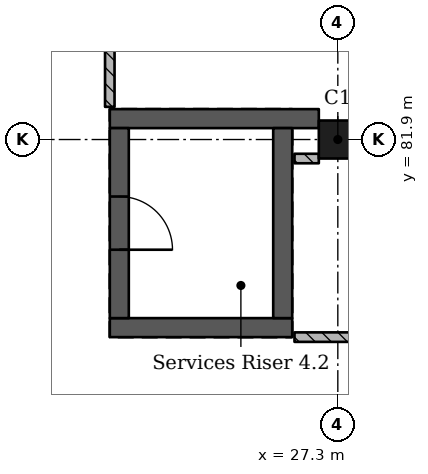
"""IFC4 building model, lengths in metres.
Left out: names, types, materials, properties, quantities, classifications, styles, units other than length and angle.
Written with IfcOpenShell. Run it as: python <this file> out.ifc"""

import sys

from ifc_helpers import new_model, si_unit, direction, frame, frame_2d, origin, origin_2d, place, context, subcontext, project, spatial, rectangle, extrude, element, fill, save


model = new_model("IFC4")
c1 = context("Model", 3, precision=1e-05, world=origin(), true_north=direction((0.0, 1.0)))
c2 = subcontext(c1, "Body", "Model", "MODEL_VIEW")
j1 = project(units=[si_unit("LENGTHUNIT", "METRE"), si_unit("PLANEANGLEUNIT", "RADIAN")], contexts=[c1])
p1 = place(None, origin())
s1 = spatial("IfcSite", under=j1, at=p1, CompositionType="ELEMENT")
p2 = place(p1, origin())
s2 = spatial("IfcBuilding", under=s1, at=p2, CompositionType="ELEMENT")
p3 = place(p2, frame((0.0, 0.0, 24.57)))
s3 = spatial("IfcBuildingStorey", under=s2, at=p3, CompositionType="ELEMENT", Elevation=24.57)
p4 = place(p3, frame((27.3, 81.9, 0.0), z_axis=(0.0, 0.0, 1.0), x_axis=(1.0, 0.0, 0.0)))
e1 = element("IfcColumn", 1, at=p4, inside=s3, PredefinedType="COLUMN", context=c2, shape_type="SweptSolid", body=[
    extrude(rectangle(XDim=0.5, YDim=0.5, at=origin_2d()), origin(), (0.0, 0.0, 1.0), 4.55),
])
p5 = place(p3, frame((26.7, 79.425, 0.0), z_axis=(0.0, 0.0, 1.0), x_axis=(-1.0, 0.0, 0.0)))
e2 = element("IfcWall", 2, at=p5, inside=s3, PredefinedType="SHEAR", context=c2, shape_type="SweptSolid", body=[
    extrude(rectangle(XDim=2.4, YDim=0.25, at=frame_2d((1.2, 0.0))), origin(), (0.0, 0.0, 1.0), 4.55),
])
p6 = place(p3, frame((27.05, 82.175, 0.0), z_axis=(0.0, 0.0, 1.0), x_axis=(-1.0, 0.0, 0.0)))
e3 = element("IfcWall", 3, at=p6, inside=s3, PredefinedType="SHEAR", context=c2, shape_type="SweptSolid", body=[
    extrude(rectangle(XDim=2.75, YDim=0.25, at=frame_2d((1.375, 0.0))), origin(), (0.0, 0.0, 1.0), 4.55),
])
p7 = place(p3, frame((24.425, 82.05, 0.0), z_axis=(0.0, 0.0, 1.0), x_axis=(0.0, -1.0, 0.0)))
e4 = element("IfcWall", 4, at=p7, inside=s3, PredefinedType="SHEAR", context=c2, shape_type="SweptSolid", body=[
    extrude(rectangle(XDim=2.5, YDim=0.25, at=frame_2d((1.25, 0.0))), origin(), (0.0, 0.0, 1.0), 4.55),
])
p8 = place(p7, frame((0.9, 0.0, 0.0)))
e5 = element("IfcOpeningElement", 5, at=p8, cuts=e4, PredefinedType="OPENING", context=c2, shape_type="SweptSolid", body=[
    extrude(rectangle(XDim=0.7, YDim=2.1, at=frame_2d((0.35, 1.05))), frame((0.0, 0.135, 0.0), z_axis=(0.0, -1.0, 0.0), x_axis=(1.0, 0.0, 0.0)), (0.0, 0.0, 1.0), 0.27),
])
p9 = place(p3, frame((26.575, 82.05, 0.0), z_axis=(0.0, 0.0, 1.0), x_axis=(0.0, -1.0, 0.0)))
e6 = element("IfcWall", 6, at=p9, inside=s3, PredefinedType="SHEAR", context=c2, shape_type="SweptSolid", body=[
    extrude(rectangle(XDim=2.5, YDim=0.25, at=frame_2d((1.25, 0.0))), origin(), (0.0, 0.0, 1.0), 4.55),
])
p10 = place(p3, frame((24.3, 82.33, 0.0), z_axis=(0.0, 0.0, 1.0), x_axis=(0.0, 1.0, 0.0)))
e7 = element("IfcWall", 7, at=p10, inside=s3, PredefinedType="PARTITIONING", context=c2, shape_type="SweptSolid", body=[
    extrude(rectangle(XDim=6.97, YDim=0.125, at=frame_2d((3.485, 0.0))), origin(), (0.0, 0.0, 1.0), 4.35),
])
p11 = place(p3, frame((26.73, 81.65, 0.0), z_axis=(0.0, 0.0, 1.0), x_axis=(1.0, 0.0, 0.0)))
e8 = element("IfcWall", 8, at=p11, inside=s3, PredefinedType="PARTITIONING", context=c2, shape_type="SweptSolid", body=[
    extrude(rectangle(XDim=0.32, YDim=0.125, at=frame_2d((0.16, 0.0))), origin(), (0.0, 0.0, 1.0), 4.35),
])
p12 = place(p3, frame((28.163, 79.3, 0.0), z_axis=(0.0, 0.0, 1.0), x_axis=(-1.0, 0.0, 0.0)))
e9 = element("IfcWall", 9, at=p12, inside=s3, PredefinedType="PARTITIONING", context=c2, shape_type="SweptSolid", body=[
    extrude(rectangle(XDim=1.433, YDim=0.125, at=frame_2d((0.716, 0.0))), origin(), (0.0, 0.0, 1.0), 4.35),
])
p13 = place(p8, origin())
e10 = element("IfcDoor", 10, at=p13, inside=s3, OperationType="SINGLE_SWING_LEFT", PredefinedType="DOOR", context=c2, shape_type="SweptSolid", body=[
    extrude(rectangle(XDim=0.7, YDim=2.1, at=frame_2d((0.35, 1.05))), frame((0.0, 0.025, 0.0), z_axis=(0.0, -1.0, 0.0), x_axis=(1.0, 0.0, 0.0)), (0.0, 0.0, 1.0), 0.05),
])
fill(e5, e10)
save(model, sys.argv[1])
